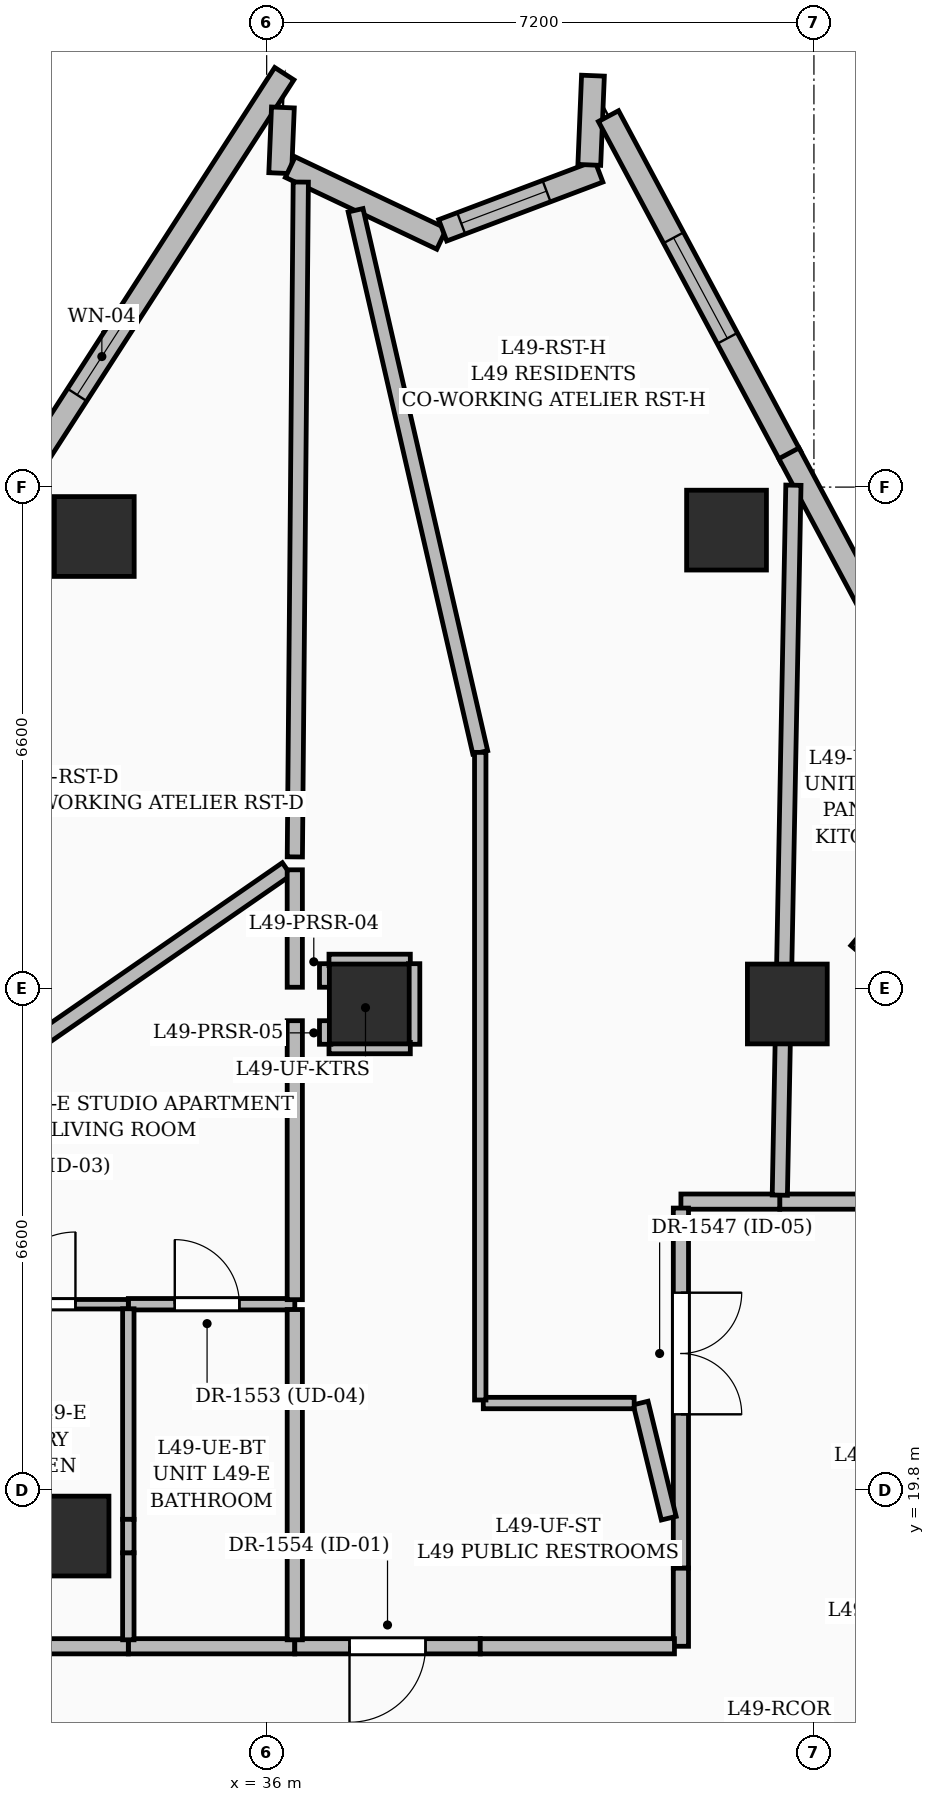
"""IFC4 building model, lengths in metres.
Left out: names, types, materials, properties, quantities, classifications, styles, units other than length and angle.
Written with IfcOpenShell. Run it as: python <this file> out.ifc"""

import sys

from ifc_helpers import new_model, si_unit, direction, frame, frame_2d, origin, origin_2d, place, context, subcontext, project, spatial, rectangle, extrude, element, fill, save


model = new_model("IFC4")
c1 = context("Model", 3, precision=1e-05, world=origin(), true_north=direction((0.0, 1.0)))
c2 = subcontext(c1, "Body", "Model", "MODEL_VIEW")
j1 = project(units=[si_unit("LENGTHUNIT", "METRE"), si_unit("PLANEANGLEUNIT", "RADIAN")], contexts=[c1])
p1 = place(None, origin())
s1 = spatial("IfcSite", under=j1, at=p1, CompositionType="ELEMENT")
p2 = place(p1, origin())
s2 = spatial("IfcBuilding", under=s1, at=p2, CompositionType="ELEMENT")
p3 = place(p2, frame((0.0, 0.0, 189.6)))
s3 = spatial("IfcBuildingStorey", under=s2, at=p3, CompositionType="ELEMENT", Elevation=189.6)
for number, where, z_axis, x_axis in (
    (1, (42.85, 26.2, 0.0), (0.0, 0.0, 1.0), (1.0, 0.0, 0.0)),
    (2, (37.35, 26.2, 0.0), (0.0, 0.0, 1.0), (1.0, 0.0, 0.0)),
    (3, (33.4, 19.2, 0.0), (0.0, 0.0, 1.0), (1.0, 0.0, 0.0)),
    (4, (42.05, 32.434, 0.0), (0.0, 0.0, 1.0), (1.0, 0.0, 0.0)),
    (5, (33.732, 32.35, 0.0), (0.0, 0.0, 1.0), (1.0, 0.0, 0.0)),
):
    element("IfcColumn", number, at=place(p3, frame(where, z_axis=z_axis, x_axis=x_axis)), inside=s3, PredefinedType="COLUMN", context=c2, shape_type="SweptSolid", body=[
        extrude(rectangle(XDim=1.05, YDim=1.05, at=origin_2d()), origin(), (0.0, 0.0, 1.0), 3.6),
    ])
p4 = place(p3, frame((31.853, 31.65, 0.0), z_axis=(0.0, 0.0, 1.0), x_axis=(0.542006403754, 0.84037435604, 0.0)))
e6 = element("IfcWall", 6, at=p4, inside=s3, PredefinedType="SOLIDWALL", context=c2, shape_type="SweptSolid", body=[
    extrude(rectangle(XDim=8.079, YDim=0.3, at=frame_2d((4.039, 0.0))), origin(), (0.0, 0.0, 1.0), 3.35),
])
p5 = place(p4, frame((3.05, 0.0, 0.8)))
e7 = element("IfcOpeningElement", 7, at=p5, cuts=e6, PredefinedType="OPENING", context=c2, shape_type="SweptSolid", body=[
    extrude(rectangle(XDim=1.2, YDim=1.8, at=frame_2d((0.6, 0.9))), frame((0.0, 0.16, 0.0), z_axis=(0.0, -1.0, 0.0), x_axis=(1.0, 0.0, 0.0)), (0.0, 0.0, 1.0), 0.32),
])
p6 = place(p3, frame((36.214, 37.994, 0.0), z_axis=(0.0, 0.0, 1.0), x_axis=(-0.040926134278, -0.999162174791, 0.0)))
e8 = element("IfcWall", 8, at=p6, inside=s3, PredefinedType="SOLIDWALL", context=c2, shape_type="SweptSolid", body=[
    extrude(rectangle(XDim=0.865, YDim=0.3, at=frame_2d((0.433, 0.0))), origin(), (0.0, 0.0, 1.0), 3.35),
])
p7 = place(p3, frame((36.311, 37.21, 0.0), z_axis=(0.0, 0.0, 1.0), x_axis=(0.903471604204, -0.428647944585, 0.0)))
e9 = element("IfcWall", 9, at=p7, inside=s3, PredefinedType="SOLIDWALL", context=c2, shape_type="SweptSolid", body=[
    extrude(rectangle(XDim=2.205, YDim=0.3, at=frame_2d((1.103, 0.0))), origin(), (0.0, 0.0, 1.0), 3.35),
])
p8 = place(p3, frame((38.316, 36.378, 0.0), z_axis=(0.0, 0.0, 1.0), x_axis=(0.935503953589, 0.353316222129, 0.0)))
e10 = element("IfcWall", 10, at=p8, inside=s3, PredefinedType="SOLIDWALL", context=c2, shape_type="SweptSolid", body=[
    extrude(rectangle(XDim=2.195, YDim=0.3, at=frame_2d((1.098, 0.0))), origin(), (0.0, 0.0, 1.0), 3.35),
])
p9 = place(p8, frame((0.26, 0.0, 0.8)))
e11 = element("IfcOpeningElement", 11, at=p9, cuts=e10, PredefinedType="OPENING", context=c2, shape_type="SweptSolid", body=[
    extrude(rectangle(XDim=1.2, YDim=1.8, at=frame_2d((0.6, 0.9))), frame((0.0, 0.16, 0.0), z_axis=(0.0, -1.0, 0.0), x_axis=(1.0, 0.0, 0.0)), (0.0, 0.0, 1.0), 0.32),
])
p10 = place(p3, frame((40.245, 37.239, 0.0), z_axis=(0.0, 0.0, 1.0), x_axis=(0.040939027533, 0.999161646594, 0.0)))
e12 = element("IfcWall", 12, at=p10, inside=s3, PredefinedType="SOLIDWALL", context=c2, shape_type="SweptSolid", body=[
    extrude(rectangle(XDim=1.175, YDim=0.3, at=frame_2d((0.587, 0.0))), origin(), (0.0, 0.0, 1.0), 3.35),
])
p11 = place(p3, frame((40.497, 37.881, 0.0), z_axis=(0.0, 0.0, 1.0), x_axis=(0.471779002276, -0.881716832669, 0.0)))
e13 = element("IfcWall", 13, at=p11, inside=s3, PredefinedType="SOLIDWALL", context=c2, shape_type="SweptSolid", body=[
    extrude(rectangle(XDim=5.085, YDim=0.3, at=frame_2d((2.542, 0.0))), origin(), (0.0, 0.0, 1.0), 3.35),
])
p12 = place(p11, frame((1.815, 0.0, 0.6)))
e14 = element("IfcOpeningElement", 14, at=p12, cuts=e13, PredefinedType="OPENING", context=c2, shape_type="SweptSolid", body=[
    extrude(rectangle(XDim=1.5, YDim=2.1, at=frame_2d((0.75, 1.05))), frame((0.0, 0.16, 0.0), z_axis=(0.0, -1.0, 0.0), x_axis=(1.0, 0.0, 0.0)), (0.0, 0.0, 1.0), 0.32),
])
p13 = place(p3, frame((42.871, 33.444, 0.0), z_axis=(0.0, 0.0, 1.0), x_axis=(0.4717652995, -0.881724164457, 0.0)))
e15 = element("IfcWall", 15, at=p13, inside=s3, PredefinedType="SOLIDWALL", context=c2, shape_type="SweptSolid", body=[
    extrude(rectangle(XDim=5.467, YDim=0.3, at=frame_2d((2.733, 0.0))), origin(), (0.0, 0.0, 1.0), 3.35),
])
p14 = place(p13, frame((2.35, 0.0, 0.8)))
e16 = element("IfcOpeningElement", 16, at=p14, cuts=e15, PredefinedType="OPENING", context=c2, shape_type="SweptSolid", body=[
    extrude(rectangle(XDim=1.2, YDim=1.8, at=frame_2d((0.6, 0.9))), frame((0.0, 0.16, 0.0), z_axis=(0.0, -1.0, 0.0), x_axis=(1.0, 0.0, 0.0)), (0.0, 0.0, 1.0), 0.32),
])
p15 = place(p3, frame((45.297, 28.644, 0.0), z_axis=(0.0, 0.0, 1.0), x_axis=(-0.645172623399, -0.76403683551, 0.0)))
e17 = element("IfcWall", 17, at=p15, inside=s3, PredefinedType="SOLIDWALL", context=c2, shape_type="SweptSolid", body=[
    extrude(rectangle(XDim=2.319, YDim=0.3, at=frame_2d((1.159, 0.0))), origin(), (0.0, 0.0, 1.0), 2.575),
])
p16 = place(p3, frame((36.37, 17.75, 0.0), z_axis=(0.0, 0.0, 1.0), x_axis=(-1.0, 0.0, 0.0)))
e18 = element("IfcWall", 18, at=p16, inside=s3, PredefinedType="PARTITIONING", context=c2, shape_type="SweptSolid", body=[
    extrude(rectangle(XDim=2.19, YDim=0.2, at=frame_2d((1.095, 0.0))), origin(), (0.0, 0.0, 1.0), 2.436),
])
p17 = place(p3, frame((34.18, 17.75, 0.0), z_axis=(0.0, 0.0, 1.0), x_axis=(-1.0, 0.0, 0.0)))
e19 = element("IfcWall", 19, at=p17, inside=s3, PredefinedType="PARTITIONING", context=c2, shape_type="SweptSolid", body=[
    extrude(rectangle(XDim=2.23, YDim=0.2, at=frame_2d((1.115, 0.0))), origin(), (0.0, 0.0, 1.0), 2.436),
])
p18 = place(p3, frame((38.81, 17.75, 0.0), z_axis=(0.0, 0.0, 1.0), x_axis=(-1.0, 0.0, 0.0)))
e20 = element("IfcWall", 20, at=p18, inside=s3, PredefinedType="PARTITIONING", context=c2, shape_type="SweptSolid", body=[
    extrude(rectangle(XDim=2.44, YDim=0.2, at=frame_2d((1.22, 0.0))), origin(), (0.0, 0.0, 1.0), 3.35),
])
p19 = place(p18, frame((0.72, 0.0, 0.0)))
e21 = element("IfcOpeningElement", 21, at=p19, cuts=e20, PredefinedType="OPENING", context=c2, shape_type="SweptSolid", body=[
    extrude(rectangle(XDim=1.0, YDim=2.2, at=frame_2d((0.5, 1.1))), frame((0.0, 0.11, 0.0), z_axis=(0.0, -1.0, 0.0), x_axis=(1.0, 0.0, 0.0)), (0.0, 0.0, 1.0), 0.22),
])
p20 = place(p3, frame((41.45, 18.78, 0.0), z_axis=(0.0, 0.0, 1.0), x_axis=(0.0, -1.0, 0.0)))
e22 = element("IfcWall", 22, at=p20, inside=s3, PredefinedType="PARTITIONING", context=c2, shape_type="SweptSolid", body=[
    extrude(rectangle(XDim=1.03, YDim=0.2, at=frame_2d((0.515, 0.0))), origin(), (0.0, 0.0, 1.0), 3.35),
])
p21 = place(p3, frame((41.365, 17.75, 0.0), z_axis=(0.0, 0.0, 1.0), x_axis=(-1.0, 0.0, 0.0)))
e23 = element("IfcWall", 23, at=p21, inside=s3, PredefinedType="PARTITIONING", context=c2, shape_type="SweptSolid", body=[
    extrude(rectangle(XDim=2.555, YDim=0.2, at=frame_2d((1.277, 0.0))), origin(), (0.0, 0.0, 1.0), 3.35),
])
p22 = place(p3, frame((43.915, 23.6, 0.0), z_axis=(0.0, 0.0, 1.0), x_axis=(-1.0, 0.0, 0.0)))
e24 = element("IfcWall", 24, at=p22, inside=s3, PredefinedType="PARTITIONING", context=c2, shape_type="SweptSolid", body=[
    extrude(rectangle(XDim=1.165, YDim=0.2, at=frame_2d((0.583, 0.0))), origin(), (0.0, 0.0, 1.0), 2.436),
])
p23 = place(p3, frame((42.75, 23.6, 0.0), z_axis=(0.0, 0.0, 1.0), x_axis=(-1.0, 0.0, 0.0)))
e25 = element("IfcWall", 25, at=p23, inside=s3, PredefinedType="PARTITIONING", context=c2, shape_type="SweptSolid", body=[
    extrude(rectangle(XDim=1.3, YDim=0.2, at=frame_2d((0.65, 0.0))), origin(), (0.0, 0.0, 1.0), 3.35),
])
p24 = place(p3, frame((41.45, 23.515, 0.0), z_axis=(0.0, 0.0, 1.0), x_axis=(0.0, -1.0, 0.0)))
e26 = element("IfcWall", 26, at=p24, inside=s3, PredefinedType="PARTITIONING", context=c2, shape_type="SweptSolid", body=[
    extrude(rectangle(XDim=4.735, YDim=0.2, at=frame_2d((2.367, 0.0))), origin(), (0.0, 0.0, 1.0), 2.853),
])
p25 = place(p24, frame((1.113, 0.0, 0.0)))
e27 = element("IfcOpeningElement", 27, at=p25, cuts=e26, PredefinedType="OPENING", context=c2, shape_type="SweptSolid", body=[
    extrude(rectangle(XDim=1.6, YDim=2.3, at=frame_2d((0.8, 1.15))), frame((0.0, 0.11, 0.0), z_axis=(0.0, -1.0, 0.0), x_axis=(1.0, 0.0, 0.0)), (0.0, 0.0, 1.0), 0.22),
])
p26 = place(p3, frame((30.01, 23.648, 0.0), z_axis=(0.0, 0.0, 1.0), x_axis=(0.822283485257, 0.569078087677, 0.0)))
e28 = element("IfcWall", 28, at=p26, inside=s3, PredefinedType="PARTITIONING", context=c2, shape_type="SweptSolid", body=[
    extrude(rectangle(XDim=7.605, YDim=0.2, at=frame_2d((3.802, 0.0))), origin(), (0.0, 0.0, 1.0), 2.464),
])
p27 = place(p3, frame((36.371, 28.135, 0.0), z_axis=(0.0, 0.0, 1.0), x_axis=(0.008827067816, 0.999961040678, 0.0)))
e29 = element("IfcWall", 29, at=p27, inside=s3, PredefinedType="PARTITIONING", context=c2, shape_type="SweptSolid", body=[
    extrude(rectangle(XDim=8.878, YDim=0.2, at=frame_2d((4.439, 0.0))), origin(), (0.0, 0.0, 1.0), 2.464),
])
p28 = place(p3, frame((34.18, 22.25, 0.0), z_axis=(0.0, 0.0, 1.0), x_axis=(1.0, 0.0, 0.0)))
e30 = element("IfcWall", 30, at=p28, inside=s3, PredefinedType="PARTITIONING", context=c2, shape_type="SweptSolid", body=[
    extrude(rectangle(XDim=2.19, YDim=0.15, at=frame_2d((1.095, 0.0))), origin(), (0.0, 0.0, 1.0), 2.436),
])
p29 = place(p28, frame((0.611, 0.0, 0.0)))
e31 = element("IfcOpeningElement", 31, at=p29, cuts=e30, PredefinedType="OPENING", context=c2, shape_type="SweptSolid", body=[
    extrude(rectangle(XDim=0.85, YDim=2.1, at=frame_2d((0.425, 1.05))), frame((0.0, 0.085, 0.0), z_axis=(0.0, -1.0, 0.0), x_axis=(1.0, 0.0, 0.0)), (0.0, 0.0, 1.0), 0.17),
])
p30 = place(p3, frame((32.035, 22.25, 0.0), z_axis=(0.0, 0.0, 1.0), x_axis=(1.0, 0.0, 0.0)))
e32 = element("IfcWall", 32, at=p30, inside=s3, PredefinedType="PARTITIONING", context=c2, shape_type="SweptSolid", body=[
    extrude(rectangle(XDim=2.145, YDim=0.125, at=frame_2d((1.073, 0.0))), origin(), (0.0, 0.0, 1.0), 2.712),
])
p31 = place(p30, frame((0.5, 0.0, 0.0)))
e33 = element("IfcOpeningElement", 33, at=p31, cuts=e32, PredefinedType="OPENING", context=c2, shape_type="SweptSolid", body=[
    extrude(rectangle(XDim=0.95, YDim=2.2, at=frame_2d((0.475, 1.1))), frame((0.0, 0.072, 0.0), z_axis=(0.0, -1.0, 0.0), x_axis=(1.0, 0.0, 0.0)), (0.0, 0.0, 1.0), 0.145),
])
p32 = place(p3, frame((36.37, 22.31, 0.0), z_axis=(0.0, 0.0, 1.0), x_axis=(0.0, 1.0, 0.0)))
e34 = element("IfcWall", 34, at=p32, inside=s3, PredefinedType="PARTITIONING", context=c2, shape_type="SweptSolid", body=[
    extrude(rectangle(XDim=3.67, YDim=0.2, at=frame_2d((1.835, 0.0))), origin(), (0.0, 0.0, 1.0), 2.436),
])
p33 = place(p3, frame((36.37, 26.42, 0.0), z_axis=(0.0, 0.0, 1.0), x_axis=(0.0, 1.0, 0.0)))
e35 = element("IfcWall", 35, at=p33, inside=s3, PredefinedType="PARTITIONING", context=c2, shape_type="SweptSolid", body=[
    extrude(rectangle(XDim=1.545, YDim=0.2, at=frame_2d((0.772, 0.0))), origin(), (0.0, 0.0, 1.0), 2.464),
])
p34 = place(p3, frame((34.18, 18.98, 0.0), z_axis=(0.0, 0.0, 1.0), x_axis=(0.0, -1.0, 0.0)))
e36 = element("IfcWall", 36, at=p34, inside=s3, PredefinedType="PARTITIONING", context=c2, shape_type="SweptSolid", body=[
    extrude(rectangle(XDim=1.145, YDim=0.15, at=frame_2d((0.573, 0.0))), origin(), (0.0, 0.0, 1.0), 2.436),
])
p35 = place(p3, frame((34.18, 22.19, 0.0), z_axis=(0.0, 0.0, 1.0), x_axis=(0.0, -1.0, 0.0)))
e37 = element("IfcWall", 37, at=p35, inside=s3, PredefinedType="PARTITIONING", context=c2, shape_type="SweptSolid", body=[
    extrude(rectangle(XDim=2.77, YDim=0.15, at=frame_2d((1.385, 0.0))), origin(), (0.0, 0.0, 1.0), 2.436),
])
p36 = place(p3, frame((36.37, 17.835, 0.0), z_axis=(0.0, 0.0, 1.0), x_axis=(0.0, 1.0, 0.0)))
e38 = element("IfcWall", 38, at=p36, inside=s3, PredefinedType="PARTITIONING", context=c2, shape_type="SweptSolid", body=[
    extrude(rectangle(XDim=4.345, YDim=0.2, at=frame_2d((2.172, 0.0))), origin(), (0.0, 0.0, 1.0), 2.853),
])
p37 = place(p3, frame((38.81, 29.51, 0.0), z_axis=(0.0, 0.0, 1.0), x_axis=(-0.224116325186, 0.974562400663, 0.0)))
e39 = element("IfcWall", 39, at=p37, inside=s3, PredefinedType="PARTITIONING", context=c2, shape_type="SweptSolid", body=[
    extrude(rectangle(XDim=7.318, YDim=0.2, at=frame_2d((3.659, 0.0))), origin(), (0.0, 0.0, 1.0), 2.57),
])
p38 = place(p3, frame((41.29, 19.435, 0.0), z_axis=(0.0, 0.0, 1.0), x_axis=(-0.237338189018, 0.971427086319, 0.0)))
e40 = element("IfcWall", 40, at=p38, inside=s3, PredefinedType="PARTITIONING", context=c2, shape_type="SweptSolid", body=[
    extrude(rectangle(XDim=1.56, YDim=0.2, at=frame_2d((0.78, 0.0))), origin(), (0.0, 0.0, 1.0), 2.853),
])
p39 = place(p3, frame((42.93, 33.025, 0.0), z_axis=(0.0, 0.0, 1.0), x_axis=(-0.019130751699, -0.999816990423, 0.0)))
e41 = element("IfcWall", 41, at=p39, inside=s3, PredefinedType="PARTITIONING", context=c2, shape_type="SweptSolid", body=[
    extrude(rectangle(XDim=9.342, YDim=0.2, at=frame_2d((4.671, 0.0))), origin(), (0.0, 0.0, 1.0), 2.436),
])
p40 = place(p3, frame((34.18, 19.42, 0.0), z_axis=(0.0, 0.0, 1.0), x_axis=(0.0, -1.0, 0.0)))
e42 = element("IfcWall", 42, at=p40, inside=s3, PredefinedType="PARTITIONING", context=c2, shape_type="SweptSolid", body=[
    extrude(rectangle(XDim=0.44, YDim=0.15, at=frame_2d((0.22, 0.0))), origin(), (0.0, 0.0, 1.0), 2.853),
])
p41 = place(p3, frame((36.77, 26.42, 0.0), z_axis=(0.0, 0.0, 1.0), x_axis=(0.0, 1.0, 0.0)))
e43 = element("IfcWall", 43, at=p41, inside=s3, PredefinedType="PARTITIONING", context=c2, shape_type="SweptSolid", body=[
    extrude(rectangle(XDim=0.31, YDim=0.15, at=frame_2d((0.155, 0.0))), origin(), (0.0, 0.0, 1.0), 2.464),
])
p42 = place(p3, frame((36.82, 26.78, 0.0), z_axis=(0.0, 0.0, 1.0), x_axis=(1.0, 0.0, 0.0)))
e44 = element("IfcWall", 44, at=p42, inside=s3, PredefinedType="PARTITIONING", context=c2, shape_type="SweptSolid", body=[
    extrude(rectangle(XDim=1.07, YDim=0.15, at=frame_2d((0.535, 0.0))), origin(), (0.0, 0.0, 1.0), 2.464),
])
p43 = place(p3, frame((37.94, 26.73, 0.0), z_axis=(0.0, 0.0, 1.0), x_axis=(0.0, -1.0, 0.0)))
e45 = element("IfcWall", 45, at=p43, inside=s3, PredefinedType="PARTITIONING", context=c2, shape_type="SweptSolid", body=[
    extrude(rectangle(XDim=1.06, YDim=0.15, at=frame_2d((0.53, 0.0))), origin(), (0.0, 0.0, 1.0), 2.436),
])
p44 = place(p3, frame((37.89, 25.62, 0.0), z_axis=(0.0, 0.0, 1.0), x_axis=(-1.0, 0.0, 0.0)))
e46 = element("IfcWall", 46, at=p44, inside=s3, PredefinedType="PARTITIONING", context=c2, shape_type="SweptSolid", body=[
    extrude(rectangle(XDim=1.07, YDim=0.15, at=frame_2d((0.535, 0.0))), origin(), (0.0, 0.0, 1.0), 2.436),
])
p45 = place(p3, frame((36.77, 25.67, 0.0), z_axis=(0.0, 0.0, 1.0), x_axis=(0.0, 1.0, 0.0)))
e47 = element("IfcWall", 47, at=p45, inside=s3, PredefinedType="PARTITIONING", context=c2, shape_type="SweptSolid", body=[
    extrude(rectangle(XDim=0.31, YDim=0.15, at=frame_2d((0.155, 0.0))), origin(), (0.0, 0.0, 1.0), 3.35),
])
p46 = place(p3, frame((40.835, 20.95, 0.0), z_axis=(0.0, 0.0, 1.0), x_axis=(-1.0, 0.0, 0.0)))
e48 = element("IfcWall", 48, at=p46, inside=s3, PredefinedType="PARTITIONING", context=c2, shape_type="SweptSolid", body=[
    extrude(rectangle(XDim=1.985, YDim=0.15, at=frame_2d((0.992, 0.0))), origin(), (0.0, 0.0, 1.0), 3.35),
])
p47 = place(p3, frame((38.81, 20.99, 0.0), z_axis=(0.0, 0.0, 1.0), x_axis=(0.0, 1.0, 0.0)))
e49 = element("IfcWall", 49, at=p47, inside=s3, PredefinedType="PARTITIONING", context=c2, shape_type="SweptSolid", body=[
    extrude(rectangle(XDim=8.52, YDim=0.15, at=frame_2d((4.26, 0.0))), origin(), (0.0, 0.0, 1.0), 2.436),
])
p48 = place(p5, origin())
e50 = element("IfcWindow", 50, at=p48, inside=s3, PartitioningType="SINGLE_PANEL", PredefinedType="WINDOW", context=c2, shape_type="SweptSolid", body=[
    extrude(rectangle(XDim=1.2, YDim=1.8, at=frame_2d((0.6, 0.9))), frame((0.0, 0.03, 0.0), z_axis=(0.0, -1.0, 0.0), x_axis=(1.0, 0.0, 0.0)), (0.0, 0.0, 1.0), 0.06),
])
fill(e7, e50)
p49 = place(p9, origin())
e51 = element("IfcWindow", 51, at=p49, inside=s3, PartitioningType="SINGLE_PANEL", PredefinedType="WINDOW", context=c2, shape_type="SweptSolid", body=[
    extrude(rectangle(XDim=1.2, YDim=1.8, at=frame_2d((0.6, 0.9))), frame((0.0, 0.03, 0.0), z_axis=(0.0, -1.0, 0.0), x_axis=(1.0, 0.0, 0.0)), (0.0, 0.0, 1.0), 0.06),
])
fill(e11, e51)
p50 = place(p12, origin())
e52 = element("IfcWindow", 52, at=p50, inside=s3, PartitioningType="SINGLE_PANEL", PredefinedType="WINDOW", context=c2, shape_type="SweptSolid", body=[
    extrude(rectangle(XDim=1.5, YDim=2.1, at=frame_2d((0.75, 1.05))), frame((0.0, 0.03, 0.0), z_axis=(0.0, -1.0, 0.0), x_axis=(1.0, 0.0, 0.0)), (0.0, 0.0, 1.0), 0.06),
])
fill(e14, e52)
p51 = place(p25, origin())
e53 = element("IfcDoor", 53, at=p51, inside=s3, OperationType="DOUBLE_DOOR_SINGLE_SWING", PredefinedType="DOOR", context=c2, shape_type="SweptSolid", body=[
    extrude(rectangle(XDim=1.6, YDim=2.3, at=frame_2d((0.8, 1.15))), frame((0.0, 0.025, 0.0), z_axis=(0.0, -1.0, 0.0), x_axis=(1.0, 0.0, 0.0)), (0.0, 0.0, 1.0), 0.05),
])
fill(e27, e53)
p52 = place(p31, origin())
e54 = element("IfcDoor", 54, at=p52, inside=s3, OperationType="SINGLE_SWING_RIGHT", PredefinedType="DOOR", context=c2, shape_type="SweptSolid", body=[
    extrude(rectangle(XDim=0.95, YDim=2.2, at=frame_2d((0.475, 1.1))), frame((0.0, 0.025, 0.0), z_axis=(0.0, -1.0, 0.0), x_axis=(1.0, 0.0, 0.0)), (0.0, 0.0, 1.0), 0.05),
])
fill(e33, e54)
p53 = place(p29, origin())
e55 = element("IfcDoor", 55, at=p53, inside=s3, OperationType="SINGLE_SWING_LEFT", PredefinedType="DOOR", context=c2, shape_type="SweptSolid", body=[
    extrude(rectangle(XDim=0.85, YDim=2.1, at=frame_2d((0.425, 1.05))), frame((0.0, 0.025, 0.0), z_axis=(0.0, -1.0, 0.0), x_axis=(1.0, 0.0, 0.0)), (0.0, 0.0, 1.0), 0.05),
])
fill(e31, e55)
p54 = place(p19, origin())
e56 = element("IfcDoor", 56, at=p54, inside=s3, OperationType="SINGLE_SWING_RIGHT", PredefinedType="DOOR", context=c2, shape_type="SweptSolid", body=[
    extrude(rectangle(XDim=1.0, YDim=2.2, at=frame_2d((0.5, 1.1))), frame((0.0, 0.025, 0.0), z_axis=(0.0, -1.0, 0.0), x_axis=(1.0, 0.0, 0.0)), (0.0, 0.0, 1.0), 0.05),
])
fill(e21, e56)
save(model, sys.argv[1])
